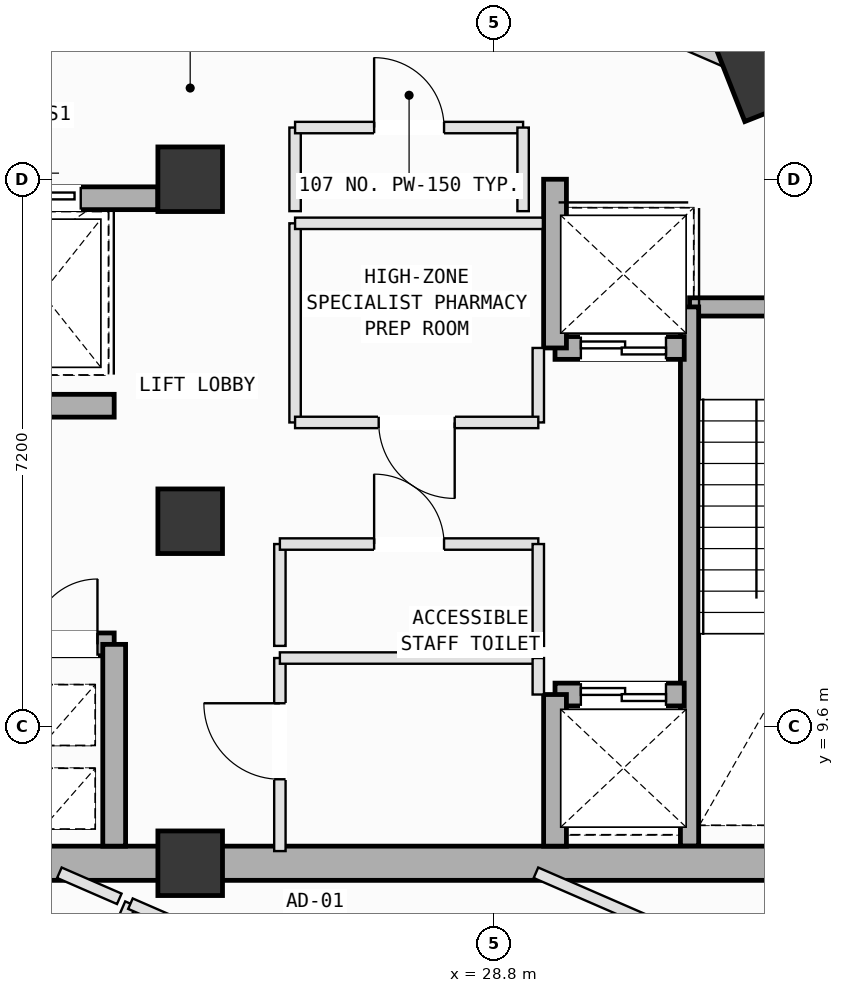
"""IFC4 building model, lengths in metres.
Left out: names, types, materials, properties, quantities, classifications, styles, units other than length and angle.
Written with IfcOpenShell. Run it as: python <this file> out.ifc"""

import sys

from ifc_helpers import new_model, si_unit, direction, frame, frame_2d, origin, origin_2d, place, context, subcontext, project, spatial, rectangle, extrude, element, fill, save


model = new_model("IFC4")
c1 = context("Model", 3, precision=1e-05, world=origin(), true_north=direction((0.0, 1.0)))
c2 = subcontext(c1, "Body", "Model", "MODEL_VIEW")
j1 = project(units=[si_unit("LENGTHUNIT", "METRE"), si_unit("PLANEANGLEUNIT", "RADIAN")], contexts=[c1])
p1 = place(None, origin())
s1 = spatial("IfcSite", under=j1, at=p1, CompositionType="ELEMENT")
p2 = place(p1, origin())
s2 = spatial("IfcBuilding", under=s1, at=p2, CompositionType="ELEMENT")
p3 = place(p2, frame((0.0, 0.0, 320.6)))
s3 = spatial("IfcBuildingStorey", under=s2, at=p3, CompositionType="ELEMENT", Elevation=320.6)
for number, where, z_axis, x_axis in (
    (1, (24.8, 7.8, 0.0), (0.0, 0.0, 1.0), (1.0, 0.0, 0.0)),
    (2, (24.8, 12.3, 0.0), (0.0, 0.0, 1.0), (1.0, 0.0, 0.0)),
    (3, (24.8, 16.8, 0.0), (0.0, 0.0, 1.0), (1.0, 0.0, 0.0)),
):
    element("IfcColumn", number, at=place(p3, frame(where, z_axis=z_axis, x_axis=x_axis)), inside=s3, PredefinedType="COLUMN", context=c2, shape_type="SweptSolid", body=[
        extrude(rectangle(XDim=0.85, YDim=0.85, at=origin_2d()), origin(), (0.0, 0.0, 1.0), 4.0),
    ])
p4 = place(p3, frame((32.226, 18.255, 0.002), z_axis=(0.0, 0.0, 1.0), x_axis=(-0.366501226724, 0.930417567982, 0.0)))
e4 = element("IfcColumn", 4, at=p4, inside=s3, PredefinedType="COLUMN", context=c2, shape_type="SweptSolid", body=[
    extrude(rectangle(XDim=1.2, YDim=0.75, at=origin_2d()), origin(), (0.0, 0.0, 1.0), 3.996),
])
p5 = place(p3, frame((25.484, 21.187, 0.0), z_axis=(0.0, 0.0, 1.0), x_axis=(0.917060568388, -0.398747932794, 0.0)))
e5 = element("IfcWall", 5, at=p5, inside=s3, PredefinedType="SOLIDWALL", context=c2, shape_type="SweptSolid", body=[
    extrude(rectangle(XDim=6.955, YDim=0.28, at=frame_2d((3.478, 0.0))), origin(), (0.0, 0.0, 1.0), 2.765),
])
p6 = place(p3, frame((31.37, 15.12, 0.0), z_axis=(0.0, 0.0, 1.0), x_axis=(1.0, 0.0, 0.0)))
e6 = element("IfcWall", 6, at=p6, inside=s3, PredefinedType="SOLIDWALL", context=c2, shape_type="SweptSolid", body=[
    extrude(rectangle(XDim=3.46, YDim=0.24, at=frame_2d((1.73, 0.0))), origin(), (0.0, 0.0, 1.0), 3.78),
])
p7 = place(p6, frame((2.14, 0.0, 0.0)))
e7 = element("IfcOpeningElement", 7, at=p7, cuts=e6, PredefinedType="OPENING", context=c2, shape_type="SweptSolid", body=[
    extrude(rectangle(XDim=1.1, YDim=2.15, at=frame_2d((0.55, 1.075))), frame((0.0, 0.13, 0.0), z_axis=(0.0, -1.0, 0.0), x_axis=(1.0, 0.0, 0.0)), (0.0, 0.0, 1.0), 0.26),
])
p8 = place(p3, frame((31.37, 8.025, 0.0), z_axis=(0.0, 0.0, 1.0), x_axis=(0.0, 1.0, 0.0)))
e8 = element("IfcWall", 8, at=p8, inside=s3, PredefinedType="SOLIDWALL", context=c2, shape_type="SweptSolid", body=[
    extrude(rectangle(XDim=7.095, YDim=0.24, at=frame_2d((3.548, 0.0))), origin(), (0.0, 0.0, 1.0), 3.78),
])
for number, where, z_axis, x_axis in (
    (9, (14.0, 7.8, 0.0), (0.0, 0.0, 1.0), (1.0, 0.0, 0.0)),
    (10, (24.8, 7.8, 0.0), (0.0, 0.0, 1.0), (1.0, 0.0, 0.0)),
):
    element("IfcWall", number, at=place(p3, frame(where, z_axis=z_axis, x_axis=x_axis)), inside=s3, PredefinedType="SHEAR", context=c2, shape_type="SweptSolid", body=[
        extrude(rectangle(XDim=10.8, YDim=0.45, at=frame_2d((5.4, 0.0))), origin(), (0.0, 0.0, 1.0), 3.78),
    ])
p9 = place(p3, frame((19.85, 16.55, 0.0), z_axis=(0.0, 0.0, 1.0), x_axis=(1.0, 0.0, 0.0)))
e11 = element("IfcWall", 11, at=p9, inside=s3, PredefinedType="SOLIDWALL", context=c2, shape_type="SweptSolid", body=[
    extrude(rectangle(XDim=4.525, YDim=0.3, at=frame_2d((2.262, 0.0))), origin(), (0.0, 0.0, 1.0), 3.78),
])
p10 = place(p9, frame((0.475, 0.0, 0.0)))
e12 = element("IfcOpeningElement", 12, at=p10, cuts=e11, PredefinedType="OPENING", context=c2, shape_type="SweptSolid", body=[
    extrude(rectangle(XDim=1.25, YDim=2.18, at=frame_2d((0.625, 1.09))), frame((0.0, 0.16, 0.0), z_axis=(0.0, -1.0, 0.0), x_axis=(1.0, 0.0, 0.0)), (0.0, 0.0, 1.0), 0.32),
])
p11 = place(p9, frame((2.49, 0.0, 0.0)))
e13 = element("IfcOpeningElement", 13, at=p11, cuts=e11, PredefinedType="OPENING", context=c2, shape_type="SweptSolid", body=[
    extrude(rectangle(XDim=1.02, YDim=2.12, at=frame_2d((0.51, 1.06))), frame((0.0, 0.16, 0.0), z_axis=(0.0, -1.0, 0.0), x_axis=(1.0, 0.0, 0.0)), (0.0, 0.0, 1.0), 0.32),
])
p12 = place(p3, frame((18.5, 10.68, 0.0), z_axis=(0.0, 0.0, 1.0), x_axis=(1.0, 0.0, 0.0)))
e14 = element("IfcWall", 14, at=p12, inside=s3, PredefinedType="SOLIDWALL", context=c2, shape_type="SweptSolid", body=[
    extrude(rectangle(XDim=5.3, YDim=0.3, at=frame_2d((2.65, 0.0))), origin(), (0.0, 0.0, 1.0), 3.78),
])
p13 = place(p12, frame((4.22, 0.0, 0.0)))
e15 = element("IfcOpeningElement", 15, at=p13, cuts=e14, PredefinedType="OPENING", context=c2, shape_type="SweptSolid", body=[
    extrude(rectangle(XDim=0.86, YDim=2.06, at=frame_2d((0.43, 1.03))), frame((0.0, 0.16, 0.0), z_axis=(0.0, -1.0, 0.0), x_axis=(1.0, 0.0, 0.0)), (0.0, 0.0, 1.0), 0.32),
])
p14 = place(p12, frame((0.425, 0.0, 0.0)))
e16 = element("IfcOpeningElement", 16, at=p14, cuts=e14, PredefinedType="OPENING", context=c2, shape_type="SweptSolid", body=[
    extrude(rectangle(XDim=1.25, YDim=2.18, at=frame_2d((0.625, 1.09))), frame((0.0, 0.16, 0.0), z_axis=(0.0, -1.0, 0.0), x_axis=(1.0, 0.0, 0.0)), (0.0, 0.0, 1.0), 0.32),
])
p15 = place(p12, frame((2.525, 0.0, 0.0)))
e17 = element("IfcOpeningElement", 17, at=p15, cuts=e14, PredefinedType="OPENING", context=c2, shape_type="SweptSolid", body=[
    extrude(rectangle(XDim=1.25, YDim=2.18, at=frame_2d((0.625, 1.09))), frame((0.0, 0.16, 0.0), z_axis=(0.0, -1.0, 0.0), x_axis=(1.0, 0.0, 0.0)), (0.0, 0.0, 1.0), 0.32),
])
p16 = place(p3, frame((18.5, 13.82, 0.0), z_axis=(0.0, 0.0, 1.0), x_axis=(1.0, 0.0, 0.0)))
e18 = element("IfcWall", 18, at=p16, inside=s3, PredefinedType="SOLIDWALL", context=c2, shape_type="SweptSolid", body=[
    extrude(rectangle(XDim=5.3, YDim=0.3, at=frame_2d((2.65, 0.0))), origin(), (0.0, 0.0, 1.0), 3.78),
])
p17 = place(p16, frame((0.18, 0.0, 0.0)))
e19 = element("IfcOpeningElement", 19, at=p17, cuts=e18, PredefinedType="OPENING", context=c2, shape_type="SweptSolid", body=[
    extrude(rectangle(XDim=1.1, YDim=2.15, at=frame_2d((0.55, 1.075))), frame((0.0, 0.16, 0.0), z_axis=(0.0, -1.0, 0.0), x_axis=(1.0, 0.0, 0.0)), (0.0, 0.0, 1.0), 0.32),
])
p18 = place(p3, frame((23.8, 8.025, 0.0), z_axis=(0.0, 0.0, 1.0), x_axis=(0.0, 1.0, 0.0)))
e20 = element("IfcWall", 20, at=p18, inside=s3, PredefinedType="SOLIDWALL", context=c2, shape_type="SweptSolid", body=[
    extrude(rectangle(XDim=2.655, YDim=0.3, at=frame_2d((1.328, 0.0))), origin(), (0.0, 0.0, 1.0), 3.78),
])
p19 = place(p3, frame((29.6, 10.02, 0.0), z_axis=(0.0, 0.0, 1.0), x_axis=(1.0, 0.0, 0.0)))
e21 = element("IfcWall", 21, at=p19, inside=s3, PredefinedType="SOLIDWALL", context=c2, shape_type="SweptSolid", body=[
    extrude(rectangle(XDim=1.7, YDim=0.3, at=frame_2d((0.85, 0.0))), origin(), (0.0, 0.0, 1.0), 3.78),
])
p20 = place(p19, frame((0.34, 0.0, 0.0)))
e22 = element("IfcOpeningElement", 22, at=p20, cuts=e21, PredefinedType="OPENING", context=c2, shape_type="SweptSolid", body=[
    extrude(rectangle(XDim=1.12, YDim=2.15, at=frame_2d((0.56, 1.075))), frame((0.0, 0.16, 0.0), z_axis=(0.0, -1.0, 0.0), x_axis=(1.0, 0.0, 0.0)), (0.0, 0.0, 1.0), 0.32),
])
p21 = place(p3, frame((29.6, 8.025, 0.0), z_axis=(0.0, 0.0, 1.0), x_axis=(0.0, 1.0, 0.0)))
e23 = element("IfcWall", 23, at=p21, inside=s3, PredefinedType="SOLIDWALL", context=c2, shape_type="SweptSolid", body=[
    extrude(rectangle(XDim=1.995, YDim=0.3, at=frame_2d((0.998, 0.0))), origin(), (0.0, 0.0, 1.0), 3.78),
])
p22 = place(p3, frame((29.6, 14.58, 0.0), z_axis=(0.0, 0.0, 1.0), x_axis=(1.0, 0.0, 0.0)))
e24 = element("IfcWall", 24, at=p22, inside=s3, PredefinedType="SOLIDWALL", context=c2, shape_type="SweptSolid", body=[
    extrude(rectangle(XDim=1.7, YDim=0.3, at=frame_2d((0.85, 0.0))), origin(), (0.0, 0.0, 1.0), 3.78),
])
p23 = place(p22, frame((0.34, 0.0, 0.0)))
e25 = element("IfcOpeningElement", 25, at=p23, cuts=e24, PredefinedType="OPENING", context=c2, shape_type="SweptSolid", body=[
    extrude(rectangle(XDim=1.12, YDim=2.15, at=frame_2d((0.56, 1.075))), frame((0.0, 0.16, 0.0), z_axis=(0.0, -1.0, 0.0), x_axis=(1.0, 0.0, 0.0)), (0.0, 0.0, 1.0), 0.32),
])
p24 = place(p3, frame((29.6, 14.58, 0.0), z_axis=(0.0, 0.0, 1.0), x_axis=(0.0, 1.0, 0.0)))
e26 = element("IfcWall", 26, at=p24, inside=s3, PredefinedType="SOLIDWALL", context=c2, shape_type="SweptSolid", body=[
    extrude(rectangle(XDim=2.22, YDim=0.3, at=frame_2d((1.11, 0.0))), origin(), (0.0, 0.0, 1.0), 3.78),
])
p25 = place(p3, frame((25.98, 7.96, 0.0), z_axis=(0.0, 0.0, 1.0), x_axis=(0.0, 1.0, 0.0)))
e27 = element("IfcWall", 27, at=p25, inside=s3, PredefinedType="PARTITIONING", context=c2, shape_type="SweptSolid", body=[
    extrude(rectangle(XDim=2.54, YDim=0.15, at=frame_2d((1.27, 0.0))), origin(), (0.0, 0.0, 1.0), 3.78),
])
p26 = place(p25, frame((0.945, 0.0, 0.0)))
e28 = element("IfcOpeningElement", 28, at=p26, cuts=e27, PredefinedType="OPENING", context=c2, shape_type="SweptSolid", body=[
    extrude(rectangle(XDim=1.0, YDim=2.12, at=frame_2d((0.5, 1.06))), frame((0.0, 0.085, 0.0), z_axis=(0.0, -1.0, 0.0), x_axis=(1.0, 0.0, 0.0)), (0.0, 0.0, 1.0), 0.17),
])
p27 = place(p3, frame((25.98, 10.5, 0.0), z_axis=(0.0, 0.0, 1.0), x_axis=(1.0, 0.0, 0.0)))
e29 = element("IfcWall", 29, at=p27, inside=s3, PredefinedType="PARTITIONING", context=c2, shape_type="SweptSolid", body=[
    extrude(rectangle(XDim=3.4, YDim=0.15, at=frame_2d((1.7, 0.0))), origin(), (0.0, 0.0, 1.0), 3.78),
])
p28 = place(p3, frame((29.38, 10.5, 0.0), z_axis=(0.0, 0.0, 1.0), x_axis=(0.0, -1.0, 0.0)))
e30 = element("IfcWall", 30, at=p28, inside=s3, PredefinedType="PARTITIONING", context=c2, shape_type="SweptSolid", body=[
    extrude(rectangle(XDim=0.48, YDim=0.15, at=frame_2d((0.24, 0.0))), origin(), (0.0, 0.0, 1.0), 3.78),
])
p29 = place(p3, frame((25.98, 10.66, 0.0), z_axis=(0.0, 0.0, 1.0), x_axis=(0.0, 1.0, 0.0)))
e31 = element("IfcWall", 31, at=p29, inside=s3, PredefinedType="PARTITIONING", context=c2, shape_type="SweptSolid", body=[
    extrude(rectangle(XDim=1.34, YDim=0.15, at=frame_2d((0.67, 0.0))), origin(), (0.0, 0.0, 1.0), 3.78),
])
p30 = place(p3, frame((25.98, 12.0, 0.0), z_axis=(0.0, 0.0, 1.0), x_axis=(1.0, 0.0, 0.0)))
e32 = element("IfcWall", 32, at=p30, inside=s3, PredefinedType="PARTITIONING", context=c2, shape_type="SweptSolid", body=[
    extrude(rectangle(XDim=3.4, YDim=0.15, at=frame_2d((1.7, 0.0))), origin(), (0.0, 0.0, 1.0), 3.78),
])
p31 = place(p30, frame((1.24, 0.0, 0.0)))
e33 = element("IfcOpeningElement", 33, at=p31, cuts=e32, PredefinedType="OPENING", context=c2, shape_type="SweptSolid", body=[
    extrude(rectangle(XDim=0.92, YDim=2.1, at=frame_2d((0.46, 1.05))), frame((0.0, 0.085, 0.0), z_axis=(0.0, -1.0, 0.0), x_axis=(1.0, 0.0, 0.0)), (0.0, 0.0, 1.0), 0.17),
])
p32 = place(p3, frame((29.38, 12.0, 0.0), z_axis=(0.0, 0.0, 1.0), x_axis=(0.0, -1.0, 0.0)))
e34 = element("IfcWall", 34, at=p32, inside=s3, PredefinedType="PARTITIONING", context=c2, shape_type="SweptSolid", body=[
    extrude(rectangle(XDim=1.34, YDim=0.15, at=frame_2d((0.67, 0.0))), origin(), (0.0, 0.0, 1.0), 3.78),
])
p33 = place(p3, frame((26.18, 13.6, 0.0), z_axis=(0.0, 0.0, 1.0), x_axis=(0.0, 1.0, 0.0)))
e35 = element("IfcWall", 35, at=p33, inside=s3, PredefinedType="PARTITIONING", context=c2, shape_type="SweptSolid", body=[
    extrude(rectangle(XDim=2.62, YDim=0.15, at=frame_2d((1.31, 0.0))), origin(), (0.0, 0.0, 1.0), 3.78),
])
p34 = place(p3, frame((26.18, 16.22, 0.0), z_axis=(0.0, 0.0, 1.0), x_axis=(1.0, 0.0, 0.0)))
e36 = element("IfcWall", 36, at=p34, inside=s3, PredefinedType="PARTITIONING", context=c2, shape_type="SweptSolid", body=[
    extrude(rectangle(XDim=3.26, YDim=0.15, at=frame_2d((1.63, 0.0))), origin(), (0.0, 0.0, 1.0), 3.78),
])
p35 = place(p3, frame((29.38, 14.58, 0.0), z_axis=(0.0, 0.0, 1.0), x_axis=(0.0, -1.0, 0.0)))
e37 = element("IfcWall", 37, at=p35, inside=s3, PredefinedType="PARTITIONING", context=c2, shape_type="SweptSolid", body=[
    extrude(rectangle(XDim=0.98, YDim=0.15, at=frame_2d((0.49, 0.0))), origin(), (0.0, 0.0, 1.0), 3.78),
])
p36 = place(p3, frame((29.38, 13.6, 0.0), z_axis=(0.0, 0.0, 1.0), x_axis=(-1.0, 0.0, 0.0)))
e38 = element("IfcWall", 38, at=p36, inside=s3, PredefinedType="PARTITIONING", context=c2, shape_type="SweptSolid", body=[
    extrude(rectangle(XDim=3.2, YDim=0.15, at=frame_2d((1.6, 0.0))), origin(), (0.0, 0.0, 1.0), 3.78),
])
p37 = place(p36, frame((1.1, 0.0, 0.0)))
e39 = element("IfcOpeningElement", 39, at=p37, cuts=e38, PredefinedType="OPENING", context=c2, shape_type="SweptSolid", body=[
    extrude(rectangle(XDim=1.0, YDim=2.12, at=frame_2d((0.5, 1.06))), frame((0.0, 0.085, 0.0), z_axis=(0.0, -1.0, 0.0), x_axis=(1.0, 0.0, 0.0)), (0.0, 0.0, 1.0), 0.17),
])
p38 = place(p3, frame((26.18, 16.38, 0.0), z_axis=(0.0, 0.0, 1.0), x_axis=(0.0, 1.0, 0.0)))
e40 = element("IfcWall", 40, at=p38, inside=s3, PredefinedType="PARTITIONING", context=c2, shape_type="SweptSolid", body=[
    extrude(rectangle(XDim=1.1, YDim=0.15, at=frame_2d((0.55, 0.0))), origin(), (0.0, 0.0, 1.0), 3.78),
])
p39 = place(p3, frame((26.18, 17.48, 0.0), z_axis=(0.0, 0.0, 1.0), x_axis=(1.0, 0.0, 0.0)))
e41 = element("IfcWall", 41, at=p39, inside=s3, PredefinedType="PARTITIONING", context=c2, shape_type="SweptSolid", body=[
    extrude(rectangle(XDim=3.0, YDim=0.15, at=frame_2d((1.5, 0.0))), origin(), (0.0, 0.0, 1.0), 3.78),
])
p40 = place(p39, frame((1.04, 0.0, 0.0)))
e42 = element("IfcOpeningElement", 42, at=p40, cuts=e41, PredefinedType="OPENING", context=c2, shape_type="SweptSolid", body=[
    extrude(rectangle(XDim=0.92, YDim=2.1, at=frame_2d((0.46, 1.05))), frame((0.0, 0.085, 0.0), z_axis=(0.0, -1.0, 0.0), x_axis=(1.0, 0.0, 0.0)), (0.0, 0.0, 1.0), 0.17),
])
p41 = place(p3, frame((29.18, 17.48, 0.0), z_axis=(0.0, 0.0, 1.0), x_axis=(0.0, -1.0, 0.0)))
e43 = element("IfcWall", 43, at=p41, inside=s3, PredefinedType="PARTITIONING", context=c2, shape_type="SweptSolid", body=[
    extrude(rectangle(XDim=1.1, YDim=0.15, at=frame_2d((0.55, 0.0))), origin(), (0.0, 0.0, 1.0), 3.78),
])
p42 = place(p3, frame((20.912, 0.134, 0.0), z_axis=(0.0, 0.0, 1.0), x_axis=(0.398731849313, 0.917067561493, 0.0)))
e44 = element("IfcWall", 44, at=p42, inside=s3, PredefinedType="PARTITIONING", context=c2, shape_type="SweptSolid", body=[
    extrude(rectangle(XDim=7.779, YDim=0.15, at=frame_2d((3.89, 0.0))), origin(), (0.0, 0.0, 1.0), 2.765),
])
p43 = place(p42, frame((3.46, 0.0, 0.0)))
e45 = element("IfcOpeningElement", 45, at=p43, cuts=e44, PredefinedType="OPENING", context=c2, shape_type="SweptSolid", body=[
    extrude(rectangle(XDim=0.86, YDim=2.06, at=frame_2d((0.43, 1.03))), frame((0.0, 0.085, 0.0), z_axis=(0.0, -1.0, 0.0), x_axis=(1.0, 0.0, 0.0)), (0.0, 0.0, 1.0), 0.17),
])
p44 = place(p3, frame((24.014, 7.268, 0.0), z_axis=(0.0, 0.0, 1.0), x_axis=(0.91706671013, -0.398733807411, 0.0)))
e46 = element("IfcWall", 46, at=p44, inside=s3, PredefinedType="PARTITIONING", context=c2, shape_type="SweptSolid", body=[
    extrude(rectangle(XDim=4.64, YDim=0.15, at=frame_2d((2.32, 0.0))), origin(), (0.0, 0.0, 1.0), 3.78),
])
p45 = place(p44, frame((1.89, 0.0, 0.0)))
e47 = element("IfcOpeningElement", 47, at=p45, cuts=e46, PredefinedType="OPENING", context=c2, shape_type="SweptSolid", body=[
    extrude(rectangle(XDim=0.86, YDim=2.06, at=frame_2d((0.43, 1.03))), frame((0.0, 0.085, 0.0), z_axis=(0.0, -1.0, 0.0), x_axis=(1.0, 0.0, 0.0)), (0.0, 0.0, 1.0), 0.17),
])
p46 = place(p3, frame((23.079, 7.675, 0.0), z_axis=(0.0, 0.0, 1.0), x_axis=(0.91686666905, -0.399193576082, 0.0)))
e48 = element("IfcWall", 48, at=p46, inside=s3, PredefinedType="PARTITIONING", context=c2, shape_type="SweptSolid", body=[
    extrude(rectangle(XDim=0.859, YDim=0.15, at=frame_2d((0.43, 0.0))), origin(), (0.0, 0.0, 1.0), 3.78),
])
p47 = place(p3, frame((36.107, 4.736, 0.0), z_axis=(0.0, 0.0, 1.0), x_axis=(-0.917031075712, 0.398815754676, 0.0)))
e49 = element("IfcWall", 49, at=p47, inside=s3, PredefinedType="PARTITIONING", context=c2, shape_type="SweptSolid", body=[
    extrude(rectangle(XDim=7.369, YDim=0.15, at=frame_2d((3.685, 0.0))), origin(), (0.0, 0.0, 1.0), 3.78),
])
p48 = place(p13, origin())
e50 = element("IfcDoor", 50, at=p48, inside=s3, OperationType="SINGLE_SWING_RIGHT", PredefinedType="DOOR", context=c2, shape_type="SweptSolid", body=[
    extrude(rectangle(XDim=0.86, YDim=2.06, at=frame_2d((0.43, 1.03))), frame((0.0, 0.025, 0.0), z_axis=(0.0, -1.0, 0.0), x_axis=(1.0, 0.0, 0.0)), (0.0, 0.0, 1.0), 0.05),
])
fill(e15, e50)
p49 = place(p20, origin())
e51 = element("IfcDoor", 51, at=p49, inside=s3, OperationType="DOUBLE_DOOR_SLIDING", PredefinedType="DOOR", context=c2, shape_type="SweptSolid", body=[
    extrude(rectangle(XDim=1.12, YDim=2.15, at=frame_2d((0.56, 1.075))), frame((0.0, 0.025, 0.0), z_axis=(0.0, -1.0, 0.0), x_axis=(1.0, 0.0, 0.0)), (0.0, 0.0, 1.0), 0.05),
])
fill(e22, e51)
p50 = place(p23, origin())
e52 = element("IfcDoor", 52, at=p50, inside=s3, OperationType="DOUBLE_DOOR_SLIDING", PredefinedType="DOOR", context=c2, shape_type="SweptSolid", body=[
    extrude(rectangle(XDim=1.12, YDim=2.15, at=frame_2d((0.56, 1.075))), frame((0.0, 0.025, 0.0), z_axis=(0.0, -1.0, 0.0), x_axis=(1.0, 0.0, 0.0)), (0.0, 0.0, 1.0), 0.05),
])
fill(e25, e52)
p51 = place(p11, origin())
e53 = element("IfcDoor", 53, at=p51, inside=s3, OperationType="SLIDING_TO_LEFT", PredefinedType="DOOR", context=c2, shape_type="SweptSolid", body=[
    extrude(rectangle(XDim=1.02, YDim=2.12, at=frame_2d((0.51, 1.06))), frame((0.0, 0.025, 0.0), z_axis=(0.0, -1.0, 0.0), x_axis=(1.0, 0.0, 0.0)), (0.0, 0.0, 1.0), 0.05),
])
fill(e13, e53)
p52 = place(p26, origin())
e54 = element("IfcDoor", 54, at=p52, inside=s3, OperationType="SINGLE_SWING_RIGHT", PredefinedType="DOOR", context=c2, shape_type="SweptSolid", body=[
    extrude(rectangle(XDim=1.0, YDim=2.12, at=frame_2d((0.5, 1.06))), frame((0.0, 0.025, 0.0), z_axis=(0.0, -1.0, 0.0), x_axis=(1.0, 0.0, 0.0)), (0.0, 0.0, 1.0), 0.05),
])
fill(e28, e54)
p53 = place(p31, origin())
e55 = element("IfcDoor", 55, at=p53, inside=s3, OperationType="SINGLE_SWING_LEFT", PredefinedType="DOOR", context=c2, shape_type="SweptSolid", body=[
    extrude(rectangle(XDim=0.92, YDim=2.1, at=frame_2d((0.46, 1.05))), frame((0.0, 0.025, 0.0), z_axis=(0.0, -1.0, 0.0), x_axis=(1.0, 0.0, 0.0)), (0.0, 0.0, 1.0), 0.05),
])
fill(e33, e55)
p54 = place(p37, origin())
e56 = element("IfcDoor", 56, at=p54, inside=s3, OperationType="SINGLE_SWING_LEFT", PredefinedType="DOOR", context=c2, shape_type="SweptSolid", body=[
    extrude(rectangle(XDim=1.0, YDim=2.12, at=frame_2d((0.5, 1.06))), frame((0.0, 0.025, 0.0), z_axis=(0.0, -1.0, 0.0), x_axis=(1.0, 0.0, 0.0)), (0.0, 0.0, 1.0), 0.05),
])
fill(e39, e56)
p55 = place(p40, origin())
e57 = element("IfcDoor", 57, at=p55, inside=s3, OperationType="SINGLE_SWING_LEFT", PredefinedType="DOOR", context=c2, shape_type="SweptSolid", body=[
    extrude(rectangle(XDim=0.92, YDim=2.1, at=frame_2d((0.46, 1.05))), frame((0.0, 0.025, 0.0), z_axis=(0.0, -1.0, 0.0), x_axis=(1.0, 0.0, 0.0)), (0.0, 0.0, 1.0), 0.05),
])
fill(e42, e57)
save(model, sys.argv[1])
